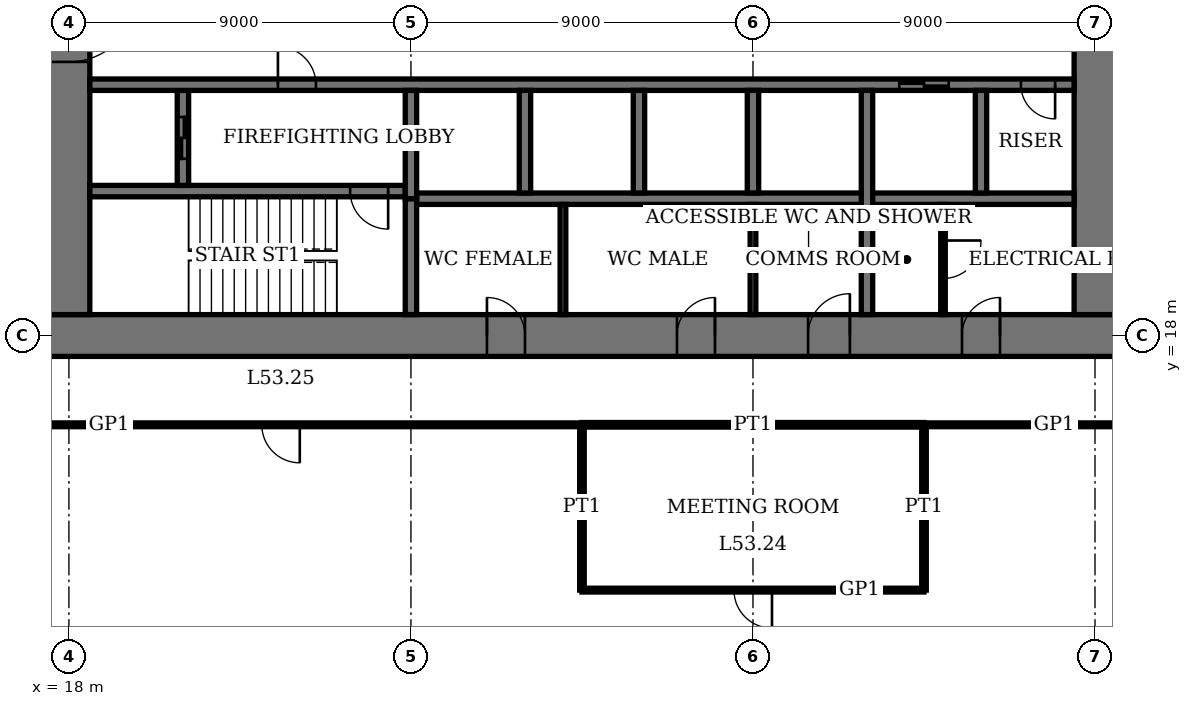
"""IFC4 building model, lengths in metres.
Left out: names, types, materials, properties, quantities, classifications, styles, units other than length and angle.
Written with IfcOpenShell. Run it as: python <this file> out.ifc"""

import sys

from ifc_helpers import new_model, si_unit, direction, frame, frame_2d, origin, place, context, subcontext, project, spatial, rectangle, extrude, element, fill, save


model = new_model("IFC4")
c1 = context("Model", 3, precision=1e-05, world=origin(), true_north=direction((0.0, 1.0)))
c2 = subcontext(c1, "Body", "Model", "MODEL_VIEW")
j1 = project(units=[si_unit("LENGTHUNIT", "METRE"), si_unit("PLANEANGLEUNIT", "RADIAN")], contexts=[c1])
p1 = place(None, origin())
s1 = spatial("IfcSite", under=j1, at=p1, CompositionType="ELEMENT")
p2 = place(p1, origin())
s2 = spatial("IfcBuilding", under=s1, at=p2, CompositionType="ELEMENT")
p3 = place(p2, frame((0.0, 0.0, 218.2)))
s3 = spatial("IfcBuildingStorey", under=s2, at=p3, CompositionType="ELEMENT", Elevation=218.2)
p4 = place(p3, frame((17.45, 18.0, 0.0), z_axis=(0.0, 0.0, 1.0), x_axis=(1.0, 0.0, 0.0)))
e1 = element("IfcWall", 1, at=p4, inside=s3, PredefinedType="SHEAR", context=c2, shape_type="SweptSolid", body=[
    extrude(rectangle(XDim=28.1, YDim=1.1, at=frame_2d((14.05, 0.0))), origin(), (0.0, 0.0, 1.0), 4.0),
])
p5 = place(p4, frame((11.55, 0.0, 0.0)))
e2 = element("IfcOpeningElement", 2, at=p5, cuts=e1, PredefinedType="OPENING", context=c2, shape_type="SweptSolid", body=[
    extrude(rectangle(XDim=1.0, YDim=2.4, at=frame_2d((0.5, 1.2))), frame((0.0, 0.56, 0.0), z_axis=(0.0, -1.0, 0.0), x_axis=(1.0, 0.0, 0.0)), (0.0, 0.0, 1.0), 1.12),
])
p6 = place(p4, frame((16.55, 0.0, 0.0)))
e3 = element("IfcOpeningElement", 3, at=p6, cuts=e1, PredefinedType="OPENING", context=c2, shape_type="SweptSolid", body=[
    extrude(rectangle(XDim=1.0, YDim=2.4, at=frame_2d((0.5, 1.2))), frame((0.0, 0.56, 0.0), z_axis=(0.0, -1.0, 0.0), x_axis=(1.0, 0.0, 0.0)), (0.0, 0.0, 1.0), 1.12),
])
p7 = place(p4, frame((20.0, 0.0, 0.0)))
e4 = element("IfcOpeningElement", 4, at=p7, cuts=e1, PredefinedType="OPENING", context=c2, shape_type="SweptSolid", body=[
    extrude(rectangle(XDim=1.1, YDim=2.4, at=frame_2d((0.55, 1.2))), frame((0.0, 0.56, 0.0), z_axis=(0.0, -1.0, 0.0), x_axis=(1.0, 0.0, 0.0)), (0.0, 0.0, 1.0), 1.12),
])
p8 = place(p4, frame((24.05, 0.0, 0.0)))
e5 = element("IfcOpeningElement", 5, at=p8, cuts=e1, PredefinedType="OPENING", context=c2, shape_type="SweptSolid", body=[
    extrude(rectangle(XDim=1.0, YDim=2.4, at=frame_2d((0.5, 1.2))), frame((0.0, 0.56, 0.0), z_axis=(0.0, -1.0, 0.0), x_axis=(1.0, 0.0, 0.0)), (0.0, 0.0, 1.0), 1.12),
])
p9 = place(p3, frame((18.0, 35.45, 0.0), z_axis=(0.0, 0.0, 1.0), x_axis=(0.0, -1.0, 0.0)))
e6 = element("IfcWall", 6, at=p9, inside=s3, PredefinedType="SHEAR", context=c2, shape_type="SweptSolid", body=[
    extrude(rectangle(XDim=16.9, YDim=1.1, at=frame_2d((8.45, 0.0))), origin(), (0.0, 0.0, 1.0), 4.0),
])
p10 = place(p9, frame((8.45, 0.0, 0.0)))
e7 = element("IfcOpeningElement", 7, at=p10, cuts=e6, PredefinedType="OPENING", context=c2, shape_type="SweptSolid", body=[
    extrude(rectangle(XDim=1.8, YDim=2.4, at=frame_2d((0.9, 1.2))), frame((0.0, 0.56, 0.0), z_axis=(0.0, -1.0, 0.0), x_axis=(1.0, 0.0, 0.0)), (0.0, 0.0, 1.0), 1.12),
])
p11 = place(p3, frame((45.0, 18.55, 0.0), z_axis=(0.0, 0.0, 1.0), x_axis=(0.0, 1.0, 0.0)))
e8 = element("IfcWall", 8, at=p11, inside=s3, PredefinedType="SHEAR", context=c2, shape_type="SweptSolid", body=[
    extrude(rectangle(XDim=16.9, YDim=1.1, at=frame_2d((8.45, 0.0))), origin(), (0.0, 0.0, 1.0), 4.0),
])
p12 = place(p11, frame((8.45, 0.0, 0.0)))
e9 = element("IfcOpeningElement", 9, at=p12, cuts=e8, PredefinedType="OPENING", context=c2, shape_type="SweptSolid", body=[
    extrude(rectangle(XDim=1.8, YDim=2.4, at=frame_2d((0.9, 1.2))), frame((0.0, 0.56, 0.0), z_axis=(0.0, -1.0, 0.0), x_axis=(1.0, 0.0, 0.0)), (0.0, 0.0, 1.0), 1.12),
])
p13 = place(p3, frame((18.55, 21.8, 0.0), z_axis=(0.0, 0.0, 1.0), x_axis=(1.0, 0.0, 0.0)))
e10 = element("IfcWall", 10, at=p13, inside=s3, PredefinedType="SHEAR", context=c2, shape_type="SweptSolid", body=[
    extrude(rectangle(XDim=8.3, YDim=0.3, at=frame_2d((4.15, 0.0))), origin(), (0.0, 0.0, 1.0), 4.0),
])
p14 = place(p13, frame((6.85, 0.0, 0.0)))
e11 = element("IfcOpeningElement", 11, at=p14, cuts=e10, PredefinedType="OPENING", context=c2, shape_type="SweptSolid", body=[
    extrude(rectangle(XDim=1.0, YDim=2.4, at=frame_2d((0.5, 1.2))), frame((0.0, 0.16, 0.0), z_axis=(0.0, -1.0, 0.0), x_axis=(1.0, 0.0, 0.0)), (0.0, 0.0, 1.0), 0.32),
])
p15 = place(p3, frame((27.0, 18.55, 0.0), z_axis=(0.0, 0.0, 1.0), x_axis=(0.0, 1.0, 0.0)))
e12 = element("IfcWall", 12, at=p15, inside=s3, PredefinedType="SHEAR", context=c2, shape_type="SweptSolid", body=[
    extrude(rectangle(XDim=3.05, YDim=0.3, at=frame_2d((1.525, 0.0))), origin(), (0.0, 0.0, 1.0), 4.0),
])
p16 = place(p3, frame((21.0, 21.95, 0.0), z_axis=(0.0, 0.0, 1.0), x_axis=(0.0, 1.0, 0.0)))
e13 = element("IfcWall", 13, at=p16, inside=s3, PredefinedType="SHEAR", context=c2, shape_type="SweptSolid", body=[
    extrude(rectangle(XDim=2.5, YDim=0.3, at=frame_2d((1.25, 0.0))), origin(), (0.0, 0.0, 1.0), 4.0),
])
p17 = place(p16, frame((0.7, 0.0, 0.0)))
e14 = element("IfcOpeningElement", 14, at=p17, cuts=e13, PredefinedType="OPENING", context=c2, shape_type="SweptSolid", body=[
    extrude(rectangle(XDim=1.1, YDim=2.4, at=frame_2d((0.55, 1.2))), frame((0.0, 0.16, 0.0), z_axis=(0.0, -1.0, 0.0), x_axis=(1.0, 0.0, 0.0)), (0.0, 0.0, 1.0), 0.32),
])
p18 = place(p3, frame((18.55, 24.6, 0.0), z_axis=(0.0, 0.0, 1.0), x_axis=(1.0, 0.0, 0.0)))
e15 = element("IfcWall", 15, at=p18, inside=s3, PredefinedType="SHEAR", context=c2, shape_type="SweptSolid", body=[
    extrude(rectangle(XDim=25.9, YDim=0.3, at=frame_2d((12.95, 0.0))), origin(), (0.0, 0.0, 1.0), 4.0),
])
p19 = place(p18, frame((4.95, 0.0, 0.0)))
e16 = element("IfcOpeningElement", 16, at=p19, cuts=e15, PredefinedType="OPENING", context=c2, shape_type="SweptSolid", body=[
    extrude(rectangle(XDim=1.0, YDim=2.4, at=frame_2d((0.5, 1.2))), frame((0.0, 0.16, 0.0), z_axis=(0.0, -1.0, 0.0), x_axis=(1.0, 0.0, 0.0)), (0.0, 0.0, 1.0), 0.32),
])
p20 = place(p18, frame((24.5, 0.0, 0.0)))
e17 = element("IfcOpeningElement", 17, at=p20, cuts=e15, PredefinedType="OPENING", context=c2, shape_type="SweptSolid", body=[
    extrude(rectangle(XDim=0.9, YDim=2.1, at=frame_2d((0.45, 1.05))), frame((0.0, 0.16, 0.0), z_axis=(0.0, -1.0, 0.0), x_axis=(1.0, 0.0, 0.0)), (0.0, 0.0, 1.0), 0.32),
])
p21 = place(p18, frame((21.3, 0.0, 0.0)))
e18 = element("IfcOpeningElement", 18, at=p21, cuts=e15, PredefinedType="OPENING", context=c2, shape_type="SweptSolid", body=[
    extrude(rectangle(XDim=1.3, YDim=2.4, at=frame_2d((0.65, 1.2))), frame((0.0, 0.16, 0.0), z_axis=(0.0, -1.0, 0.0), x_axis=(1.0, 0.0, 0.0)), (0.0, 0.0, 1.0), 0.32),
])
p22 = place(p3, frame((27.15, 21.6, 0.0), z_axis=(0.0, 0.0, 1.0), x_axis=(1.0, 0.0, 0.0)))
e19 = element("IfcWall", 19, at=p22, inside=s3, PredefinedType="SHEAR", context=c2, shape_type="SweptSolid", body=[
    extrude(rectangle(XDim=17.3, YDim=0.3, at=frame_2d((8.65, 0.0))), origin(), (0.0, 0.0, 1.0), 4.0),
])
for number, where, z_axis, x_axis in (
    (20, (30.0, 21.75, 0.0), (0.0, 0.0, 1.0), (0.0, 1.0, 0.0)),
    (21, (33.0, 21.75, 0.0), (0.0, 0.0, 1.0), (0.0, 1.0, 0.0)),
    (22, (36.0, 21.75, 0.0), (0.0, 0.0, 1.0), (0.0, 1.0, 0.0)),
):
    element("IfcWall", number, at=place(p3, frame(where, z_axis=z_axis, x_axis=x_axis)), inside=s3, PredefinedType="SHEAR", context=c2, shape_type="SweptSolid", body=[
        extrude(rectangle(XDim=2.7, YDim=0.3, at=frame_2d((1.35, 0.0))), origin(), (0.0, 0.0, 1.0), 4.0),
    ])
p23 = place(p3, frame((39.0, 18.55, 0.0), z_axis=(0.0, 0.0, 1.0), x_axis=(0.0, 1.0, 0.0)))
e23 = element("IfcWall", 23, at=p23, inside=s3, PredefinedType="SHEAR", context=c2, shape_type="SweptSolid", body=[
    extrude(rectangle(XDim=5.9, YDim=0.3, at=frame_2d((2.95, 0.0))), origin(), (0.0, 0.0, 1.0), 4.0),
])
p24 = place(p3, frame((42.0, 21.75, 0.0), z_axis=(0.0, 0.0, 1.0), x_axis=(0.0, 1.0, 0.0)))
e24 = element("IfcWall", 24, at=p24, inside=s3, PredefinedType="SHEAR", context=c2, shape_type="SweptSolid", body=[
    extrude(rectangle(XDim=2.7, YDim=0.3, at=frame_2d((1.35, 0.0))), origin(), (0.0, 0.0, 1.0), 4.0),
])
p25 = place(p3, frame((27.0, 21.6, 0.0), z_axis=(0.0, 0.0, 1.0), x_axis=(0.0, 1.0, 0.0)))
e25 = element("IfcWall", 25, at=p25, inside=s3, PredefinedType="SHEAR", context=c2, shape_type="SweptSolid", body=[
    extrude(rectangle(XDim=2.85, YDim=0.3, at=frame_2d((1.425, 0.0))), origin(), (0.0, 0.0, 1.0), 4.0),
])
p26 = place(p3, frame((31.5, 11.3, 0.0), z_axis=(0.0, 0.0, 1.0), x_axis=(1.0, 0.0, 0.0)))
e26 = element("IfcWall", 26, at=p26, inside=s3, PredefinedType="PARTITIONING", context=c2, shape_type="SweptSolid", body=[
    extrude(rectangle(XDim=9.0, YDim=0.1, at=frame_2d((4.5, 0.0))), origin(), (0.0, 0.0, 1.0), 3.75),
])
p27 = place(p26, frame((4.0, 0.0, 0.0)))
e27 = element("IfcOpeningElement", 27, at=p27, cuts=e26, PredefinedType="OPENING", context=c2, shape_type="SweptSolid", body=[
    extrude(rectangle(XDim=1.0, YDim=2.4, at=frame_2d((0.5, 1.2))), frame((0.0, 0.06, 0.0), z_axis=(0.0, -1.0, 0.0), x_axis=(1.0, 0.0, 0.0)), (0.0, 0.0, 1.0), 0.12),
])
p28 = place(p3, frame((31.5, 15.65, 0.0), z_axis=(0.0, 0.0, 1.0), x_axis=(1.0, 0.0, 0.0)))
e28 = element("IfcWall", 28, at=p28, inside=s3, PredefinedType="PARTITIONING", context=c2, shape_type="SweptSolid", body=[
    extrude(rectangle(XDim=9.0, YDim=0.12, at=frame_2d((4.5, 0.0))), origin(), (0.0, 0.0, 1.0), 3.75),
])
p29 = place(p3, frame((15.65, 15.65, 0.0), z_axis=(0.0, 0.0, 1.0), x_axis=(1.0, 0.0, 0.0)))
e29 = element("IfcWall", 29, at=p29, inside=s3, PredefinedType="PARTITIONING", context=c2, shape_type="SweptSolid", body=[
    extrude(rectangle(XDim=15.85, YDim=0.1, at=frame_2d((7.925, 0.0))), origin(), (0.0, 0.0, 1.0), 3.75),
])
p30 = place(p29, frame((7.425, 0.0, 0.0)))
e30 = element("IfcOpeningElement", 30, at=p30, cuts=e29, PredefinedType="OPENING", context=c2, shape_type="SweptSolid", body=[
    extrude(rectangle(XDim=1.0, YDim=2.4, at=frame_2d((0.5, 1.2))), frame((0.0, 0.06, 0.0), z_axis=(0.0, -1.0, 0.0), x_axis=(1.0, 0.0, 0.0)), (0.0, 0.0, 1.0), 0.12),
])
p31 = place(p3, frame((40.5, 15.65, 0.0), z_axis=(0.0, 0.0, 1.0), x_axis=(1.0, 0.0, 0.0)))
e31 = element("IfcWall", 31, at=p31, inside=s3, PredefinedType="PARTITIONING", context=c2, shape_type="SweptSolid", body=[
    extrude(rectangle(XDim=6.85, YDim=0.1, at=frame_2d((3.425, 0.0))), origin(), (0.0, 0.0, 1.0), 3.75),
])
for number, where, z_axis, x_axis in (
    (32, (31.5, 11.3, 0.0), (0.0, 0.0, 1.0), (0.0, 1.0, 0.0)),
    (33, (40.5, 11.3, 0.0), (0.0, 0.0, 1.0), (0.0, 1.0, 0.0)),
):
    element("IfcWall", number, at=place(p3, frame(where, z_axis=z_axis, x_axis=x_axis)), inside=s3, PredefinedType="PARTITIONING", context=c2, shape_type="SweptSolid", body=[
        extrude(rectangle(XDim=4.35, YDim=0.12, at=frame_2d((2.175, 0.0))), origin(), (0.0, 0.0, 1.0), 3.75),
    ])
for number, where, z_axis, x_axis in (
    (34, (31.0, 18.55, 0.0), (0.0, 0.0, 1.0), (0.0, 1.0, 0.0)),
    (35, (36.0, 18.55, 0.0), (0.0, 0.0, 1.0), (0.0, 1.0, 0.0)),
):
    element("IfcWall", number, at=place(p3, frame(where, z_axis=z_axis, x_axis=x_axis)), inside=s3, PredefinedType="PARTITIONING", context=c2, shape_type="SweptSolid", body=[
        extrude(rectangle(XDim=2.9, YDim=0.15, at=frame_2d((1.45, 0.0))), origin(), (0.0, 0.0, 1.0), 3.75),
    ])
p32 = place(p3, frame((41.0, 18.55, 0.0), z_axis=(0.0, 0.0, 1.0), x_axis=(0.0, 1.0, 0.0)))
e36 = element("IfcWall", 36, at=p32, inside=s3, PredefinedType="PARTITIONING", context=c2, shape_type="SweptSolid", body=[
    extrude(rectangle(XDim=2.9, YDim=0.12, at=frame_2d((1.45, 0.0))), origin(), (0.0, 0.0, 1.0), 3.75),
])
p33 = place(p32, frame((0.95, 0.0, 0.0)))
e37 = element("IfcOpeningElement", 37, at=p33, cuts=e36, PredefinedType="OPENING", context=c2, shape_type="SweptSolid", body=[
    extrude(rectangle(XDim=1.0, YDim=2.4, at=frame_2d((0.5, 1.2))), frame((0.0, 0.07, 0.0), z_axis=(0.0, -1.0, 0.0), x_axis=(1.0, 0.0, 0.0)), (0.0, 0.0, 1.0), 0.14),
])
p34 = place(p10, origin())
e38 = element("IfcDoor", 38, at=p34, inside=s3, OperationType="DOUBLE_DOOR_DOUBLE_SWING", PredefinedType="DOOR", context=c2, shape_type="SweptSolid", body=[
    extrude(rectangle(XDim=1.8, YDim=2.4, at=frame_2d((0.9, 1.2))), frame((0.0, 0.03, 0.0), z_axis=(0.0, -1.0, 0.0), x_axis=(1.0, 0.0, 0.0)), (0.0, 0.0, 1.0), 0.06),
    extrude(rectangle(XDim=0.04, YDim=2.4, at=frame_2d((0.02, 1.2))), frame((0.0, 0.55, 0.0), z_axis=(0.0, -1.0, 0.0), x_axis=(1.0, 0.0, 0.0)), (0.0, 0.0, 1.0), 1.1),
    extrude(rectangle(XDim=0.04, YDim=2.4, at=frame_2d((1.78, 1.2))), frame((0.0, 0.55, 0.0), z_axis=(0.0, -1.0, 0.0), x_axis=(1.0, 0.0, 0.0)), (0.0, 0.0, 1.0), 1.1),
    extrude(rectangle(XDim=1.8, YDim=0.04, at=frame_2d((0.9, 2.38))), frame((0.0, 0.55, 0.0), z_axis=(0.0, -1.0, 0.0), x_axis=(1.0, 0.0, 0.0)), (0.0, 0.0, 1.0), 1.1),
])
fill(e7, e38)
p35 = place(p5, origin())
e39 = element("IfcDoor", 39, at=p35, inside=s3, OperationType="SINGLE_SWING_RIGHT", PredefinedType="DOOR", context=c2, shape_type="SweptSolid", body=[
    extrude(rectangle(XDim=1.0, YDim=2.4, at=frame_2d((0.5, 1.2))), frame((0.0, 0.025, 0.0), z_axis=(0.0, -1.0, 0.0), x_axis=(1.0, 0.0, 0.0)), (0.0, 0.0, 1.0), 0.05),
    extrude(rectangle(XDim=0.04, YDim=2.4, at=frame_2d((0.02, 1.2))), frame((0.0, 0.4, 0.0), z_axis=(0.0, -1.0, 0.0), x_axis=(1.0, 0.0, 0.0)), (0.0, 0.0, 1.0), 0.8),
    extrude(rectangle(XDim=0.04, YDim=2.4, at=frame_2d((0.98, 1.2))), frame((0.0, 0.4, 0.0), z_axis=(0.0, -1.0, 0.0), x_axis=(1.0, 0.0, 0.0)), (0.0, 0.0, 1.0), 0.8),
    extrude(rectangle(XDim=1.0, YDim=0.04, at=frame_2d((0.5, 2.38))), frame((0.0, 0.4, 0.0), z_axis=(0.0, -1.0, 0.0), x_axis=(1.0, 0.0, 0.0)), (0.0, 0.0, 1.0), 0.8),
])
fill(e2, e39)
p36 = place(p6, origin())
e40 = element("IfcDoor", 40, at=p36, inside=s3, OperationType="SINGLE_SWING_LEFT", PredefinedType="DOOR", context=c2, shape_type="SweptSolid", body=[
    extrude(rectangle(XDim=1.0, YDim=2.4, at=frame_2d((0.5, 1.2))), frame((0.0, 0.025, 0.0), z_axis=(0.0, -1.0, 0.0), x_axis=(1.0, 0.0, 0.0)), (0.0, 0.0, 1.0), 0.05),
    extrude(rectangle(XDim=0.04, YDim=2.4, at=frame_2d((0.02, 1.2))), frame((0.0, 0.4, 0.0), z_axis=(0.0, -1.0, 0.0), x_axis=(1.0, 0.0, 0.0)), (0.0, 0.0, 1.0), 0.8),
    extrude(rectangle(XDim=0.04, YDim=2.4, at=frame_2d((0.98, 1.2))), frame((0.0, 0.4, 0.0), z_axis=(0.0, -1.0, 0.0), x_axis=(1.0, 0.0, 0.0)), (0.0, 0.0, 1.0), 0.8),
    extrude(rectangle(XDim=1.0, YDim=0.04, at=frame_2d((0.5, 2.38))), frame((0.0, 0.4, 0.0), z_axis=(0.0, -1.0, 0.0), x_axis=(1.0, 0.0, 0.0)), (0.0, 0.0, 1.0), 0.8),
])
fill(e3, e40)
p37 = place(p7, origin())
e41 = element("IfcDoor", 41, at=p37, inside=s3, OperationType="SINGLE_SWING_LEFT", PredefinedType="DOOR", context=c2, shape_type="SweptSolid", body=[
    extrude(rectangle(XDim=1.1, YDim=2.4, at=frame_2d((0.55, 1.2))), frame((0.0, 0.025, 0.0), z_axis=(0.0, -1.0, 0.0), x_axis=(1.0, 0.0, 0.0)), (0.0, 0.0, 1.0), 0.05),
    extrude(rectangle(XDim=0.04, YDim=2.4, at=frame_2d((0.02, 1.2))), frame((0.0, 0.44, 0.0), z_axis=(0.0, -1.0, 0.0), x_axis=(1.0, 0.0, 0.0)), (0.0, 0.0, 1.0), 0.88),
    extrude(rectangle(XDim=0.04, YDim=2.4, at=frame_2d((1.08, 1.2))), frame((0.0, 0.44, 0.0), z_axis=(0.0, -1.0, 0.0), x_axis=(1.0, 0.0, 0.0)), (0.0, 0.0, 1.0), 0.88),
    extrude(rectangle(XDim=1.1, YDim=0.04, at=frame_2d((0.55, 2.38))), frame((0.0, 0.44, 0.0), z_axis=(0.0, -1.0, 0.0), x_axis=(1.0, 0.0, 0.0)), (0.0, 0.0, 1.0), 0.88),
])
fill(e4, e41)
p38 = place(p8, origin())
e42 = element("IfcDoor", 42, at=p38, inside=s3, OperationType="SINGLE_SWING_LEFT", PredefinedType="DOOR", context=c2, shape_type="SweptSolid", body=[
    extrude(rectangle(XDim=1.0, YDim=2.4, at=frame_2d((0.5, 1.2))), frame((0.0, 0.025, 0.0), z_axis=(0.0, -1.0, 0.0), x_axis=(1.0, 0.0, 0.0)), (0.0, 0.0, 1.0), 0.05),
    extrude(rectangle(XDim=0.04, YDim=2.4, at=frame_2d((0.02, 1.2))), frame((0.0, 0.4, 0.0), z_axis=(0.0, -1.0, 0.0), x_axis=(1.0, 0.0, 0.0)), (0.0, 0.0, 1.0), 0.8),
    extrude(rectangle(XDim=0.04, YDim=2.4, at=frame_2d((0.98, 1.2))), frame((0.0, 0.4, 0.0), z_axis=(0.0, -1.0, 0.0), x_axis=(1.0, 0.0, 0.0)), (0.0, 0.0, 1.0), 0.8),
    extrude(rectangle(XDim=1.0, YDim=0.04, at=frame_2d((0.5, 2.38))), frame((0.0, 0.4, 0.0), z_axis=(0.0, -1.0, 0.0), x_axis=(1.0, 0.0, 0.0)), (0.0, 0.0, 1.0), 0.8),
])
fill(e5, e42)
p39 = place(p14, origin())
e43 = element("IfcDoor", 43, at=p39, inside=s3, OperationType="SINGLE_SWING_RIGHT", PredefinedType="DOOR", context=c2, shape_type="SweptSolid", body=[
    extrude(rectangle(XDim=1.0, YDim=2.4, at=frame_2d((0.5, 1.2))), frame((0.0, 0.03, 0.0), z_axis=(0.0, -1.0, 0.0), x_axis=(1.0, 0.0, 0.0)), (0.0, 0.0, 1.0), 0.06),
])
fill(e11, e43)
p40 = place(p19, origin())
e44 = element("IfcDoor", 44, at=p40, inside=s3, OperationType="SINGLE_SWING_RIGHT", PredefinedType="DOOR", context=c2, shape_type="SweptSolid", body=[
    extrude(rectangle(XDim=1.0, YDim=2.4, at=frame_2d((0.5, 1.2))), frame((0.0, 0.03, 0.0), z_axis=(0.0, -1.0, 0.0), x_axis=(1.0, 0.0, 0.0)), (0.0, 0.0, 1.0), 0.06),
])
fill(e16, e44)
p41 = place(p20, origin())
e45 = element("IfcDoor", 45, at=p41, inside=s3, OperationType="SINGLE_SWING_RIGHT", PredefinedType="DOOR", context=c2, shape_type="SweptSolid", body=[
    extrude(rectangle(XDim=0.9, YDim=2.1, at=frame_2d((0.45, 1.05))), frame((0.0, 0.03, 0.0), z_axis=(0.0, -1.0, 0.0), x_axis=(1.0, 0.0, 0.0)), (0.0, 0.0, 1.0), 0.06),
])
fill(e17, e45)
p42 = place(p27, origin())
e46 = element("IfcDoor", 46, at=p42, inside=s3, OperationType="SINGLE_SWING_RIGHT", PredefinedType="DOOR", context=c2, shape_type="SweptSolid", body=[
    extrude(rectangle(XDim=1.0, YDim=2.4, at=frame_2d((0.5, 1.2))), frame((0.0, 0.02, 0.0), z_axis=(0.0, -1.0, 0.0), x_axis=(1.0, 0.0, 0.0)), (0.0, 0.0, 1.0), 0.04),
])
fill(e27, e46)
p43 = place(p30, origin())
e47 = element("IfcDoor", 47, at=p43, inside=s3, OperationType="SINGLE_SWING_RIGHT", PredefinedType="DOOR", context=c2, shape_type="SweptSolid", body=[
    extrude(rectangle(XDim=1.0, YDim=2.4, at=frame_2d((0.5, 1.2))), frame((0.0, 0.02, 0.0), z_axis=(0.0, -1.0, 0.0), x_axis=(1.0, 0.0, 0.0)), (0.0, 0.0, 1.0), 0.04),
])
fill(e30, e47)
p44 = place(p33, origin())
e48 = element("IfcDoor", 48, at=p44, inside=s3, OperationType="SINGLE_SWING_RIGHT", PredefinedType="DOOR", context=c2, shape_type="SweptSolid", body=[
    extrude(rectangle(XDim=1.0, YDim=2.4, at=frame_2d((0.5, 1.2))), frame((0.0, 0.03, 0.0), z_axis=(0.0, -1.0, 0.0), x_axis=(1.0, 0.0, 0.0)), (0.0, 0.0, 1.0), 0.06),
])
fill(e37, e48)
p45 = place(p21, origin())
e49 = element("IfcDoor", 49, at=p45, inside=s3, OperationType="DOUBLE_DOOR_SLIDING", PredefinedType="DOOR", context=c2, shape_type="SweptSolid", body=[
    extrude(rectangle(XDim=1.3, YDim=2.4, at=frame_2d((0.65, 1.2))), frame((0.0, 0.02, 0.0), z_axis=(0.0, -1.0, 0.0), x_axis=(1.0, 0.0, 0.0)), (0.0, 0.0, 1.0), 0.04),
])
fill(e18, e49)
p46 = place(p17, origin())
e50 = element("IfcDoor", 50, at=p46, inside=s3, OperationType="DOUBLE_DOOR_SLIDING", PredefinedType="DOOR", context=c2, shape_type="SweptSolid", body=[
    extrude(rectangle(XDim=1.1, YDim=2.4, at=frame_2d((0.55, 1.2))), frame((0.0, 0.03, 0.0), z_axis=(0.0, -1.0, 0.0), x_axis=(1.0, 0.0, 0.0)), (0.0, 0.0, 1.0), 0.06),
])
fill(e14, e50)
save(model, sys.argv[1])
